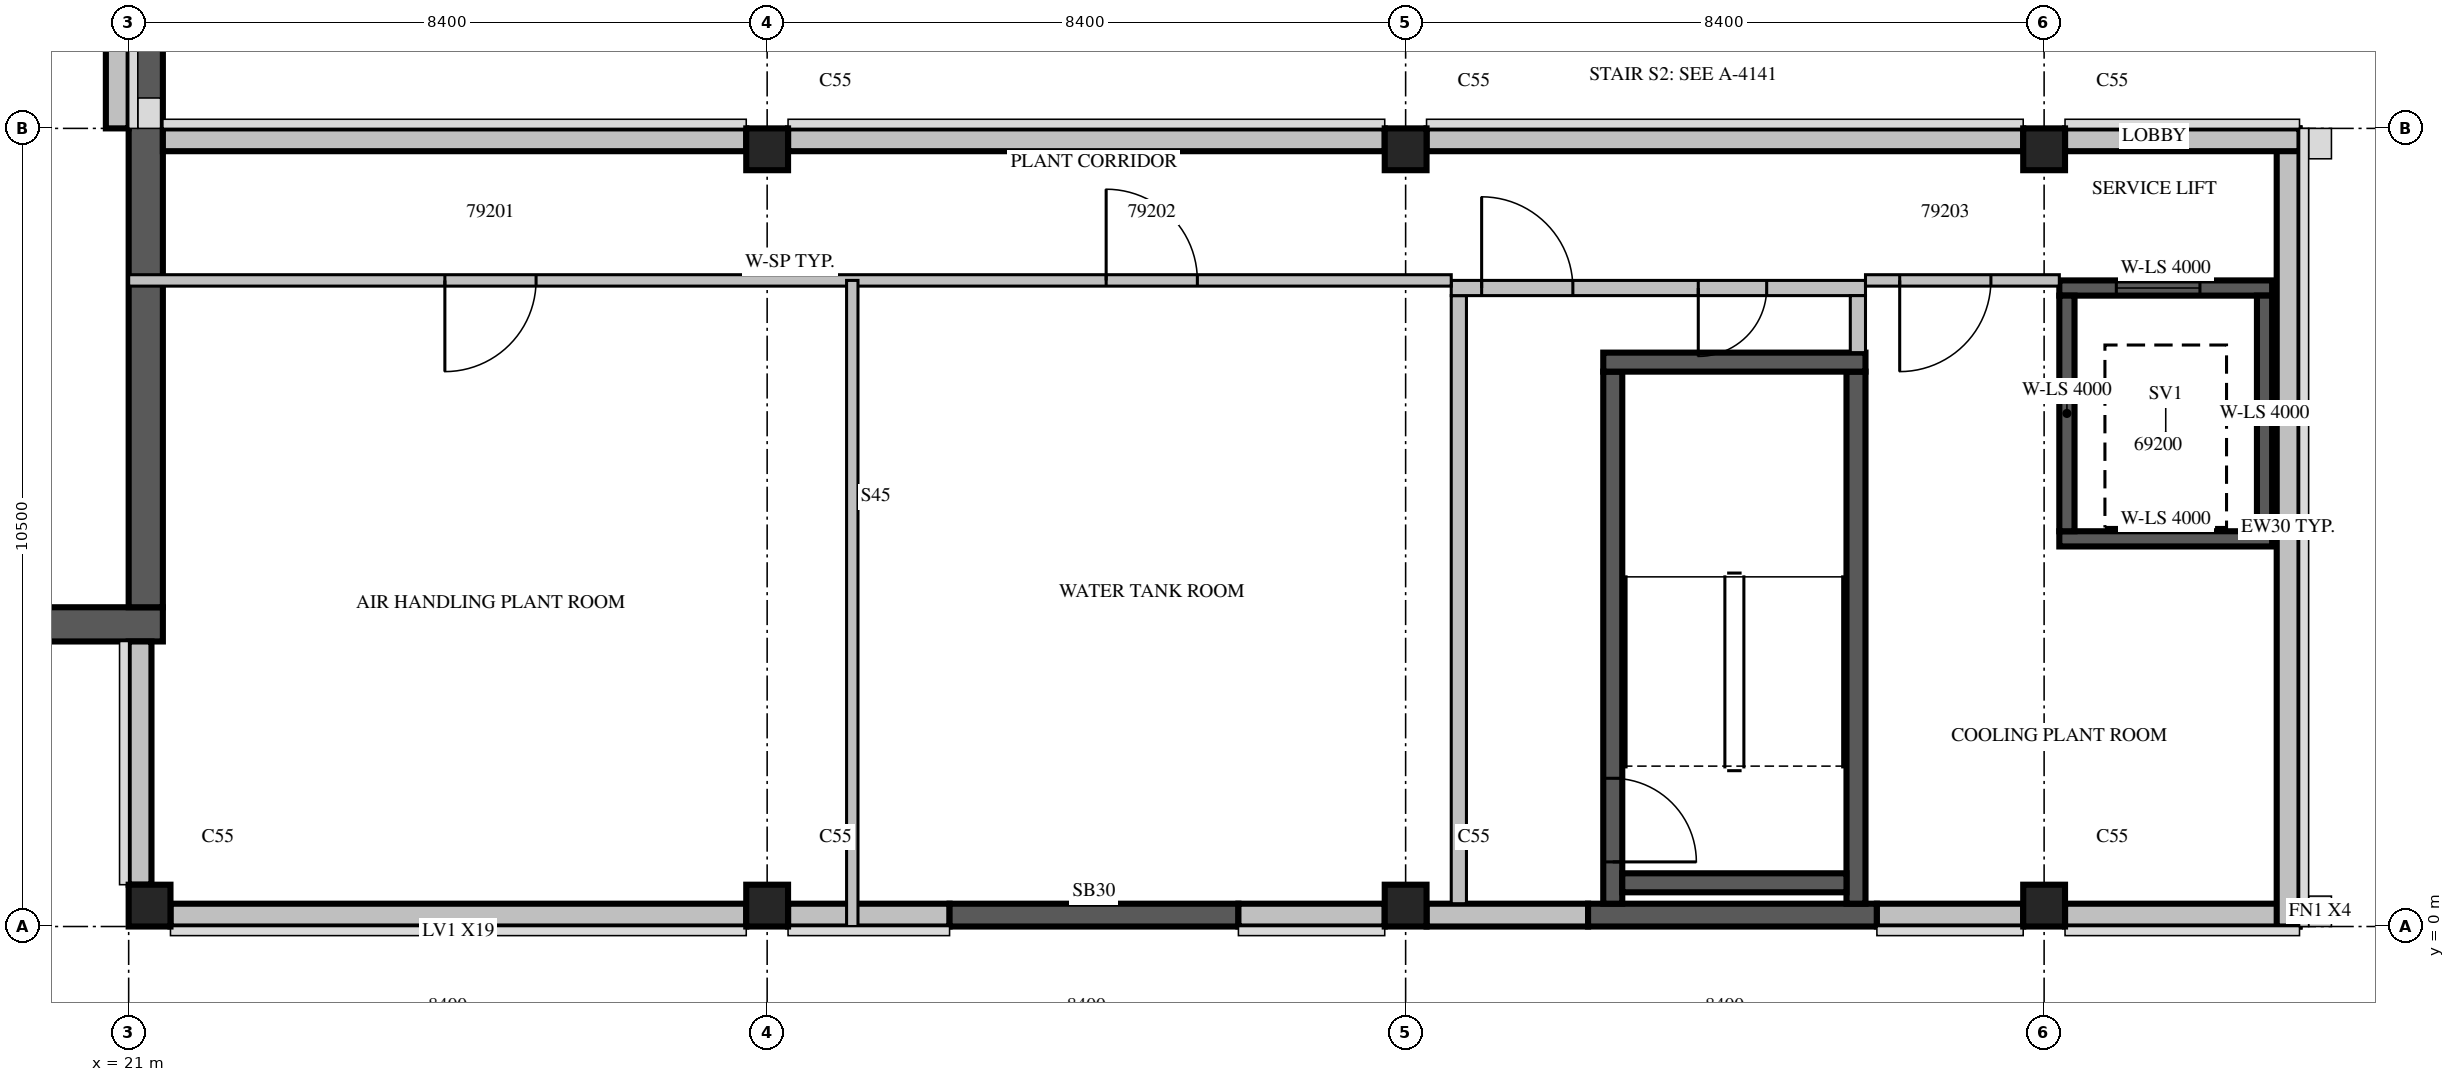
"""IFC4 building model, lengths in metres.
Left out: names, types, materials, properties, quantities, classifications, styles, units other than length and angle.
Written with IfcOpenShell. Run it as: python <this file> out.ifc"""

import sys

from ifc_helpers import new_model, si_unit, direction, frame, frame_2d, origin, origin_2d, place, context, subcontext, project, spatial, rectangle, extrude, source, transform, mapped, element, fill, save


model = new_model("IFC4")
c1 = context("Model", 3, precision=1e-05, world=origin(), true_north=direction((0.0, 1.0)))
c2 = subcontext(c1, "Body", "Model", "MODEL_VIEW")
j1 = project(units=[si_unit("LENGTHUNIT", "METRE"), si_unit("PLANEANGLEUNIT", "RADIAN")], contexts=[c1])
p1 = place(None, origin())
s1 = spatial("IfcSite", under=j1, at=p1, CompositionType="ELEMENT")
p2 = place(p1, origin())
s2 = spatial("IfcBuilding", under=s1, at=p2, CompositionType="ELEMENT")
p3 = place(p2, frame((0.0, 0.0, 372.5)))
s3 = spatial("IfcBuildingStorey", under=s2, at=p3, CompositionType="ELEMENT", Elevation=372.5)
m1 = source(origin(), c2, "Body", "SweptSolid", [
    extrude(rectangle(XDim=0.55, YDim=0.55, at=origin_2d()), origin(), (0.0, 0.0, 1.0), 4.0),
])
for number, where, z_axis, x_axis in (
    (1, (21.275, 0.275, 0.0), (0.0, 0.0, 1.0), (1.0, 0.0, 0.0)),
    (2, (29.4, 0.275, 0.0), (0.0, 0.0, 1.0), (1.0, 0.0, 0.0)),
    (3, (37.8, 0.275, 0.0), (0.0, 0.0, 1.0), (1.0, 0.0, 0.0)),
    (4, (46.2, 0.275, 0.0), (0.0, 0.0, 1.0), (1.0, 0.0, 0.0)),
    (5, (29.4, 10.225, 0.0), (0.0, 0.0, 1.0), (1.0, 0.0, 0.0)),
    (6, (37.8, 10.225, 0.0), (0.0, 0.0, 1.0), (1.0, 0.0, 0.0)),
    (7, (46.2, 10.225, 0.0), (0.0, 0.0, 1.0), (1.0, 0.0, 0.0)),
):
    element("IfcColumn", number, at=place(p3, frame(where, z_axis=z_axis, x_axis=x_axis)), inside=s3, PredefinedType="COLUMN", context=c2, shape_type="MappedRepresentation", body=[
        mapped(m1, transform((0.0, 0.0, 0.0), scale=1.0)),
    ])
p4 = place(p3, frame((4.2, 3.975, 0.0), z_axis=(0.0, 0.0, 1.0), x_axis=(1.0, 0.0, 0.0)))
e8 = element("IfcWall", 8, at=p4, inside=s3, PredefinedType="SOLIDWALL", context=c2, shape_type="SweptSolid", body=[
    extrude(rectangle(XDim=17.25, YDim=0.45, at=frame_2d((8.625, 0.0))), origin(), (0.0, 0.0, 1.0), 3.55),
])
p5 = place(p3, frame((21.225, 4.2, 0.0), z_axis=(0.0, 0.0, 1.0), x_axis=(0.0, 1.0, 0.0)))
e9 = element("IfcWall", 9, at=p5, inside=s3, PredefinedType="SOLIDWALL", context=c2, shape_type="SweptSolid", body=[
    extrude(rectangle(XDim=16.8, YDim=0.45, at=frame_2d((8.4, 0.0))), origin(), (0.0, 0.0, 1.0), 3.55),
])
p6 = place(p3, frame((21.55, 0.15, 0.0), z_axis=(0.0, 0.0, 1.0), x_axis=(1.0, 0.0, 0.0)))
e10 = element("IfcWall", 10, at=p6, inside=s3, PredefinedType="STANDARD", context=c2, shape_type="SweptSolid", body=[
    extrude(rectangle(XDim=7.575, YDim=0.3, at=frame_2d((3.788, 0.0))), origin(), (0.0, 0.0, 1.0), 3.55),
])
p7 = place(p3, frame((29.675, 0.15, 0.0), z_axis=(0.0, 0.0, 1.0), x_axis=(1.0, 0.0, 0.0)))
e11 = element("IfcWall", 11, at=p7, inside=s3, PredefinedType="STANDARD", context=c2, shape_type="SweptSolid", body=[
    extrude(rectangle(XDim=2.125, YDim=0.3, at=frame_2d((1.062, 0.0))), origin(), (0.0, 0.0, 1.0), 3.55),
])
p8 = place(p3, frame((31.8, 0.15, 0.0), z_axis=(0.0, 0.0, 1.0), x_axis=(1.0, 0.0, 0.0)))
e12 = element("IfcWall", 12, at=p8, inside=s3, PredefinedType="SOLIDWALL", context=c2, shape_type="SweptSolid", body=[
    extrude(rectangle(XDim=3.8, YDim=0.3, at=frame_2d((1.9, 0.0))), origin(), (0.0, 0.0, 1.0), 3.55),
])
p9 = place(p3, frame((35.6, 0.15, 0.0), z_axis=(0.0, 0.0, 1.0), x_axis=(1.0, 0.0, 0.0)))
e13 = element("IfcWall", 13, at=p9, inside=s3, PredefinedType="STANDARD", context=c2, shape_type="SweptSolid", body=[
    extrude(rectangle(XDim=1.925, YDim=0.3, at=frame_2d((0.963, 0.0))), origin(), (0.0, 0.0, 1.0), 3.55),
])
m2 = source(origin(), c2, "Body", "SweptSolid", [
    extrude(rectangle(XDim=2.125, YDim=0.3, at=frame_2d((1.062, 0.0))), origin(), (0.0, 0.0, 1.0), 3.55),
])
p10 = place(p3, frame((38.075, 0.15, 0.0), z_axis=(0.0, 0.0, 1.0), x_axis=(1.0, 0.0, 0.0)))
e14 = element("IfcWall", 14, at=p10, inside=s3, PredefinedType="STANDARD", context=c2, shape_type="MappedRepresentation", body=[
    mapped(m2, transform((0.0, 0.0, 0.0), scale=1.0)),
])
p11 = place(p3, frame((40.2, 0.15, 0.0), z_axis=(0.0, 0.0, 1.0), x_axis=(1.0, 0.0, 0.0)))
e15 = element("IfcWall", 15, at=p11, inside=s3, PredefinedType="SOLIDWALL", context=c2, shape_type="SweptSolid", body=[
    extrude(rectangle(XDim=3.8, YDim=0.3, at=frame_2d((1.9, 0.0))), origin(), (0.0, 0.0, 1.0), 3.55),
])
m3 = source(origin(), c2, "Body", "SweptSolid", [
    extrude(rectangle(XDim=1.925, YDim=0.3, at=frame_2d((0.963, 0.0))), origin(), (0.0, 0.0, 1.0), 3.55),
])
p12 = place(p3, frame((44.0, 0.15, 0.0), z_axis=(0.0, 0.0, 1.0), x_axis=(1.0, 0.0, 0.0)))
e16 = element("IfcWall", 16, at=p12, inside=s3, PredefinedType="STANDARD", context=c2, shape_type="MappedRepresentation", body=[
    mapped(m3, transform((0.0, 0.0, 0.0), scale=1.0)),
])
p13 = place(p3, frame((46.475, 0.15, 0.0), z_axis=(0.0, 0.0, 1.0), x_axis=(1.0, 0.0, 0.0)))
e17 = element("IfcWall", 17, at=p13, inside=s3, PredefinedType="STANDARD", context=c2, shape_type="SweptSolid", body=[
    extrude(rectangle(XDim=3.085, YDim=0.3, at=frame_2d((1.542, 0.0))), origin(), (0.0, 0.0, 1.0), 3.55),
])
p14 = place(p3, frame((49.41, 0.0, 0.0), z_axis=(0.0, 0.0, 1.0), x_axis=(0.0, 1.0, 0.0)))
e18 = element("IfcWall", 18, at=p14, inside=s3, PredefinedType="STANDARD", context=c2, shape_type="SweptSolid", body=[
    extrude(rectangle(XDim=10.5, YDim=0.3, at=frame_2d((5.25, 0.0))), origin(), (0.0, 0.0, 1.0), 3.55),
])
m4 = source(origin(), c2, "Body", "SweptSolid", [
    extrude(rectangle(XDim=3.085, YDim=0.3, at=frame_2d((1.542, 0.0))), origin(), (0.0, 0.0, 1.0), 3.55),
])
p15 = place(p3, frame((49.56, 10.35, 0.0), z_axis=(0.0, 0.0, 1.0), x_axis=(-1.0, 0.0, 0.0)))
e19 = element("IfcWall", 19, at=p15, inside=s3, PredefinedType="STANDARD", context=c2, shape_type="MappedRepresentation", body=[
    mapped(m4, transform((0.0, 0.0, 0.0), scale=1.0)),
])
p16 = place(p3, frame((45.925, 10.35, 0.0), z_axis=(0.0, 0.0, 1.0), x_axis=(-1.0, 0.0, 0.0)))
e20 = element("IfcWall", 20, at=p16, inside=s3, PredefinedType="STANDARD", context=c2, shape_type="SweptSolid", body=[
    extrude(rectangle(XDim=7.85, YDim=0.3, at=frame_2d((3.925, 0.0))), origin(), (0.0, 0.0, 1.0), 3.55),
])
m5 = source(origin(), c2, "Body", "SweptSolid", [
    extrude(rectangle(XDim=7.85, YDim=0.3, at=frame_2d((3.925, 0.0))), origin(), (0.0, 0.0, 1.0), 3.55),
])
p17 = place(p3, frame((37.525, 10.35, 0.0), z_axis=(0.0, 0.0, 1.0), x_axis=(-1.0, 0.0, 0.0)))
e21 = element("IfcWall", 21, at=p17, inside=s3, PredefinedType="STANDARD", context=c2, shape_type="MappedRepresentation", body=[
    mapped(m5, transform((0.0, 0.0, 0.0), scale=1.0)),
])
p18 = place(p3, frame((29.125, 10.35, 0.0), z_axis=(0.0, 0.0, 1.0), x_axis=(-1.0, 0.0, 0.0)))
e22 = element("IfcWall", 22, at=p18, inside=s3, PredefinedType="STANDARD", context=c2, shape_type="SweptSolid", body=[
    extrude(rectangle(XDim=7.675, YDim=0.3, at=frame_2d((3.837, 0.0))), origin(), (0.0, 0.0, 1.0), 3.55),
])
m6 = source(origin(), c2, "Body", "SweptSolid", [
    extrude(rectangle(XDim=10.5, YDim=0.3, at=frame_2d((5.25, 0.0))), origin(), (0.0, 0.0, 1.0), 3.55),
])
p19 = place(p3, frame((20.85, 10.5, 0.0), z_axis=(0.0, 0.0, 1.0), x_axis=(0.0, 1.0, 0.0)))
e23 = element("IfcWall", 23, at=p19, inside=s3, PredefinedType="STANDARD", context=c2, shape_type="MappedRepresentation", body=[
    mapped(m6, transform((0.0, 0.0, 0.0), scale=1.0)),
])
p20 = place(p3, frame((21.15, 3.75, 0.0), z_axis=(0.0, 0.0, 1.0), x_axis=(0.0, -1.0, 0.0)))
e24 = element("IfcWall", 24, at=p20, inside=s3, PredefinedType="STANDARD", context=c2, shape_type="SweptSolid", body=[
    extrude(rectangle(XDim=3.2, YDim=0.3, at=frame_2d((1.6, 0.0))), origin(), (0.0, 0.0, 1.0), 3.55),
])
m7 = source(origin(), c2, "Body", "SweptSolid", [
    extrude(rectangle(XDim=2.8, YDim=0.2, at=frame_2d((1.4, 0.0))), origin(), (0.0, 0.0, 1.0), 4.0),
])
p21 = place(p3, frame((46.4, 5.1, 0.0), z_axis=(0.0, 0.0, 1.0), x_axis=(1.0, 0.0, 0.0)))
e25 = element("IfcWall", 25, at=p21, inside=s3, PredefinedType="SOLIDWALL", context=c2, shape_type="MappedRepresentation", body=[
    mapped(m7, transform((0.0, 0.0, 0.0), scale=1.0)),
])
p22 = place(p3, frame((46.4, 8.4, 0.0), z_axis=(0.0, 0.0, 1.0), x_axis=(1.0, 0.0, 0.0)))
e26 = element("IfcWall", 26, at=p22, inside=s3, PredefinedType="SOLIDWALL", context=c2, shape_type="MappedRepresentation", body=[
    mapped(m7, transform((0.0, 0.0, 0.0), scale=1.0)),
])
m8 = source(origin(), c2, "Body", "SweptSolid", [
    extrude(rectangle(XDim=1.1, YDim=2.1, at=frame_2d((0.55, 1.05))), frame((0.0, 0.11, 0.0), z_axis=(0.0, -1.0, 0.0), x_axis=(1.0, 0.0, 0.0)), (0.0, 0.0, 1.0), 0.22),
])
p23 = place(p22, frame((0.75, 0.0, 0.0)))
e27 = element("IfcOpeningElement", 27, at=p23, cuts=e26, PredefinedType="OPENING", context=c2, shape_type="MappedRepresentation", body=[
    mapped(m8, transform((0.0, 0.0, 0.0), scale=1.0)),
])
m9 = source(origin(), c2, "Body", "SweptSolid", [
    extrude(rectangle(XDim=3.1, YDim=0.2, at=frame_2d((1.55, 0.0))), origin(), (0.0, 0.0, 1.0), 4.0),
])
for number, where, z_axis, x_axis in (
    (28, (46.5, 5.2, 0.0), (0.0, 0.0, 1.0), (0.0, 1.0, 0.0)),
    (29, (49.1, 5.2, 0.0), (0.0, 0.0, 1.0), (0.0, 1.0, 0.0)),
):
    element("IfcWall", number, at=place(p3, frame(where, z_axis=z_axis, x_axis=x_axis)), inside=s3, PredefinedType="SOLIDWALL", context=c2, shape_type="MappedRepresentation", body=[
        mapped(m9, transform((0.0, 0.0, 0.0), scale=1.0)),
    ])
m10 = source(origin(), c2, "Body", "SweptSolid", [
    extrude(rectangle(XDim=7.0, YDim=0.25, at=frame_2d((3.5, 0.0))), origin(), (0.0, 0.0, 1.0), 3.55),
])
p24 = place(p3, frame((40.525, 0.3, 0.0), z_axis=(0.0, 0.0, 1.0), x_axis=(0.0, 1.0, 0.0)))
e30 = element("IfcWall", 30, at=p24, inside=s3, PredefinedType="SOLIDWALL", context=c2, shape_type="MappedRepresentation", body=[
    mapped(m10, transform((0.0, 0.0, 0.0), scale=1.0)),
])
m11 = source(origin(), c2, "Body", "SweptSolid", [
    extrude(rectangle(XDim=1.1, YDim=2.1, at=frame_2d((0.55, 1.05))), frame((0.0, 0.135, 0.0), z_axis=(0.0, -1.0, 0.0), x_axis=(1.0, 0.0, 0.0)), (0.0, 0.0, 1.0), 0.27),
])
p25 = place(p24, frame((0.55, 0.0, 0.0)))
e31 = element("IfcOpeningElement", 31, at=p25, cuts=e30, PredefinedType="OPENING", context=c2, shape_type="MappedRepresentation", body=[
    mapped(m11, transform((0.0, 0.0, 0.0), scale=1.0)),
])
p26 = place(p3, frame((43.725, 0.3, 0.0), z_axis=(0.0, 0.0, 1.0), x_axis=(0.0, 1.0, 0.0)))
e32 = element("IfcWall", 32, at=p26, inside=s3, PredefinedType="SOLIDWALL", context=c2, shape_type="MappedRepresentation", body=[
    mapped(m10, transform((0.0, 0.0, 0.0), scale=1.0)),
])
m12 = source(origin(), c2, "Body", "SweptSolid", [
    extrude(rectangle(XDim=3.45, YDim=0.25, at=frame_2d((1.725, 0.0))), origin(), (0.0, 0.0, 1.0), 3.55),
])
p27 = place(p3, frame((40.4, 7.425, 0.0), z_axis=(0.0, 0.0, 1.0), x_axis=(1.0, 0.0, 0.0)))
e33 = element("IfcWall", 33, at=p27, inside=s3, PredefinedType="SOLIDWALL", context=c2, shape_type="MappedRepresentation", body=[
    mapped(m12, transform((0.0, 0.0, 0.0), scale=1.0)),
])
m13 = source(origin(), c2, "Body", "SweptSolid", [
    extrude(rectangle(XDim=2.95, YDim=0.25, at=frame_2d((1.475, 0.0))), origin(), (0.0, 0.0, 1.0), 3.55),
])
p28 = place(p3, frame((40.65, 0.575, 0.0), z_axis=(0.0, 0.0, 1.0), x_axis=(1.0, 0.0, 0.0)))
e34 = element("IfcWall", 34, at=p28, inside=s3, PredefinedType="SOLIDWALL", context=c2, shape_type="MappedRepresentation", body=[
    mapped(m13, transform((0.0, 0.0, 0.0), scale=1.0)),
])
m14 = source(origin(), c2, "Body", "SweptSolid", [
    extrude(rectangle(XDim=8.0, YDim=0.2, at=frame_2d((4.0, 0.0))), origin(), (0.0, 0.0, 1.0), 3.55),
])
p29 = place(p3, frame((38.5, 0.3, 0.0), z_axis=(0.0, 0.0, 1.0), x_axis=(0.0, 1.0, 0.0)))
e35 = element("IfcWall", 35, at=p29, inside=s3, PredefinedType="PARTITIONING", context=c2, shape_type="MappedRepresentation", body=[
    mapped(m14, transform((0.0, 0.0, 0.0), scale=1.0)),
])
m15 = source(origin(), c2, "Body", "SweptSolid", [
    extrude(rectangle(XDim=5.45, YDim=0.2, at=frame_2d((2.725, 0.0))), origin(), (0.0, 0.0, 1.0), 3.55),
])
p30 = place(p3, frame((38.4, 8.4, 0.0), z_axis=(0.0, 0.0, 1.0), x_axis=(1.0, 0.0, 0.0)))
e36 = element("IfcWall", 36, at=p30, inside=s3, PredefinedType="PARTITIONING", context=c2, shape_type="MappedRepresentation", body=[
    mapped(m15, transform((0.0, 0.0, 0.0), scale=1.0)),
])
m16 = source(origin(), c2, "Body", "SweptSolid", [
    extrude(rectangle(XDim=1.2, YDim=2.1, at=frame_2d((0.6, 1.05))), frame((0.0, 0.11, 0.0), z_axis=(0.0, -1.0, 0.0), x_axis=(1.0, 0.0, 0.0)), (0.0, 0.0, 1.0), 0.22),
])
p31 = place(p30, frame((0.4, 0.0, 0.0)))
e37 = element("IfcOpeningElement", 37, at=p31, cuts=e36, PredefinedType="OPENING", context=c2, shape_type="MappedRepresentation", body=[
    mapped(m16, transform((0.0, 0.0, 0.0), scale=1.0)),
])
m17 = source(origin(), c2, "Body", "SweptSolid", [
    extrude(rectangle(XDim=0.9, YDim=2.1, at=frame_2d((0.45, 1.05))), frame((0.0, 0.11, 0.0), z_axis=(0.0, -1.0, 0.0), x_axis=(1.0, 0.0, 0.0)), (0.0, 0.0, 1.0), 0.22),
])
p32 = place(p30, frame((3.25, 0.0, 0.0)))
e38 = element("IfcOpeningElement", 38, at=p32, cuts=e36, PredefinedType="OPENING", context=c2, shape_type="MappedRepresentation", body=[
    mapped(m17, transform((0.0, 0.0, 0.0), scale=1.0)),
])
m18 = source(origin(), c2, "Body", "SweptSolid", [
    extrude(rectangle(XDim=0.75, YDim=0.2, at=frame_2d((0.375, 0.0))), origin(), (0.0, 0.0, 1.0), 3.55),
])
p33 = place(p3, frame((43.75, 7.55, 0.0), z_axis=(0.0, 0.0, 1.0), x_axis=(0.0, 1.0, 0.0)))
e39 = element("IfcWall", 39, at=p33, inside=s3, PredefinedType="PARTITIONING", context=c2, shape_type="MappedRepresentation", body=[
    mapped(m18, transform((0.0, 0.0, 0.0), scale=1.0)),
])
p34 = place(p3, frame((21.0, 8.5, 0.0), z_axis=(0.0, 0.0, 1.0), x_axis=(1.0, 0.0, 0.0)))
e40 = element("IfcWall", 40, at=p34, inside=s3, PredefinedType="PARTITIONING", context=c2, shape_type="SweptSolid", body=[
    extrude(rectangle(XDim=17.4, YDim=0.15, at=frame_2d((8.7, 0.0))), origin(), (0.0, 0.0, 1.0), 3.55),
])
m19 = source(origin(), c2, "Body", "SweptSolid", [
    extrude(rectangle(XDim=1.2, YDim=2.1, at=frame_2d((0.6, 1.05))), frame((0.0, 0.085, 0.0), z_axis=(0.0, -1.0, 0.0), x_axis=(1.0, 0.0, 0.0)), (0.0, 0.0, 1.0), 0.17),
])
p35 = place(p34, frame((4.16, 0.0, 0.0)))
e41 = element("IfcOpeningElement", 41, at=p35, cuts=e40, PredefinedType="OPENING", context=c2, shape_type="MappedRepresentation", body=[
    mapped(m19, transform((0.0, 0.0, 0.0), scale=1.0)),
])
p36 = place(p34, frame((12.86, 0.0, 0.0)))
e42 = element("IfcOpeningElement", 42, at=p36, cuts=e40, PredefinedType="OPENING", context=c2, shape_type="MappedRepresentation", body=[
    mapped(m19, transform((0.0, 0.0, 0.0), scale=1.0)),
])
m20 = source(origin(), c2, "Body", "SweptSolid", [
    extrude(rectangle(XDim=2.55, YDim=0.15, at=frame_2d((1.275, 0.0))), origin(), (0.0, 0.0, 1.0), 3.55),
])
p37 = place(p3, frame((43.85, 8.5, 0.0), z_axis=(0.0, 0.0, 1.0), x_axis=(1.0, 0.0, 0.0)))
e43 = element("IfcWall", 43, at=p37, inside=s3, PredefinedType="PARTITIONING", context=c2, shape_type="MappedRepresentation", body=[
    mapped(m20, transform((0.0, 0.0, 0.0), scale=1.0)),
])
p38 = place(p37, frame((0.45, 0.0, 0.0)))
e44 = element("IfcOpeningElement", 44, at=p38, cuts=e43, PredefinedType="OPENING", context=c2, shape_type="MappedRepresentation", body=[
    mapped(m19, transform((0.0, 0.0, 0.0), scale=1.0)),
])
m21 = source(origin(), c2, "Body", "SweptSolid", [
    extrude(rectangle(XDim=8.5, YDim=0.15, at=frame_2d((4.25, 0.0))), origin(), (0.0, 0.0, 1.0), 3.55),
])
p39 = place(p3, frame((30.52, 0.0, 0.0), z_axis=(0.0, 0.0, 1.0), x_axis=(0.0, 1.0, 0.0)))
e45 = element("IfcWall", 45, at=p39, inside=s3, PredefinedType="PARTITIONING", context=c2, shape_type="MappedRepresentation", body=[
    mapped(m21, transform((0.0, 0.0, 0.0), scale=1.0)),
])
m22 = source(origin(), c2, "Body", "SweptSolid", [
    extrude(rectangle(XDim=1.1, YDim=2.1, at=frame_2d((0.55, 1.05))), frame((0.0, 0.025, 0.0), z_axis=(0.0, -1.0, 0.0), x_axis=(1.0, 0.0, 0.0)), (0.0, 0.0, 1.0), 0.05),
])
p40 = place(p23, origin())
e46 = element("IfcDoor", 46, at=p40, inside=s3, OperationType="SLIDING_TO_LEFT", PredefinedType="DOOR", context=c2, shape_type="MappedRepresentation", body=[
    mapped(m22, transform((0.0, 0.0, 0.0), scale=1.0)),
])
fill(e27, e46)
p41 = place(p25, origin())
e47 = element("IfcDoor", 47, at=p41, inside=s3, OperationType="SINGLE_SWING_RIGHT", PredefinedType="DOOR", context=c2, shape_type="MappedRepresentation", body=[
    mapped(m22, transform((0.0, 0.0, 0.0), scale=1.0)),
])
fill(e31, e47)
m23 = source(origin(), c2, "Body", "SweptSolid", [
    extrude(rectangle(XDim=1.2, YDim=2.1, at=frame_2d((0.6, 1.05))), frame((0.0, 0.025, 0.0), z_axis=(0.0, -1.0, 0.0), x_axis=(1.0, 0.0, 0.0)), (0.0, 0.0, 1.0), 0.05),
])
p42 = place(p31, origin())
e48 = element("IfcDoor", 48, at=p42, inside=s3, OperationType="SINGLE_SWING_LEFT", PredefinedType="DOOR", context=c2, shape_type="MappedRepresentation", body=[
    mapped(m23, transform((0.0, 0.0, 0.0), scale=1.0)),
])
fill(e37, e48)
m24 = source(origin(), c2, "Body", "SweptSolid", [
    extrude(rectangle(XDim=0.9, YDim=2.1, at=frame_2d((0.45, 1.05))), frame((0.0, 0.025, 0.0), z_axis=(0.0, -1.0, 0.0), x_axis=(1.0, 0.0, 0.0)), (0.0, 0.0, 1.0), 0.05),
])
p43 = place(p32, origin())
e49 = element("IfcDoor", 49, at=p43, inside=s3, OperationType="SINGLE_SWING_RIGHT", PredefinedType="DOOR", context=c2, shape_type="MappedRepresentation", body=[
    mapped(m24, transform((0.0, 0.0, 0.0), scale=1.0)),
])
fill(e38, e49)
p44 = place(p35, origin())
e50 = element("IfcDoor", 50, at=p44, inside=s3, OperationType="SINGLE_SWING_RIGHT", PredefinedType="DOOR", context=c2, shape_type="MappedRepresentation", body=[
    mapped(m23, transform((0.0, 0.0, 0.0), scale=1.0)),
])
fill(e41, e50)
p45 = place(p36, origin())
e51 = element("IfcDoor", 51, at=p45, inside=s3, OperationType="SINGLE_SWING_LEFT", PredefinedType="DOOR", context=c2, shape_type="MappedRepresentation", body=[
    mapped(m23, transform((0.0, 0.0, 0.0), scale=1.0)),
])
fill(e42, e51)
p46 = place(p38, origin())
e52 = element("IfcDoor", 52, at=p46, inside=s3, OperationType="SINGLE_SWING_RIGHT", PredefinedType="DOOR", context=c2, shape_type="MappedRepresentation", body=[
    mapped(m23, transform((0.0, 0.0, 0.0), scale=1.0)),
])
fill(e44, e52)
save(model, sys.argv[1])
